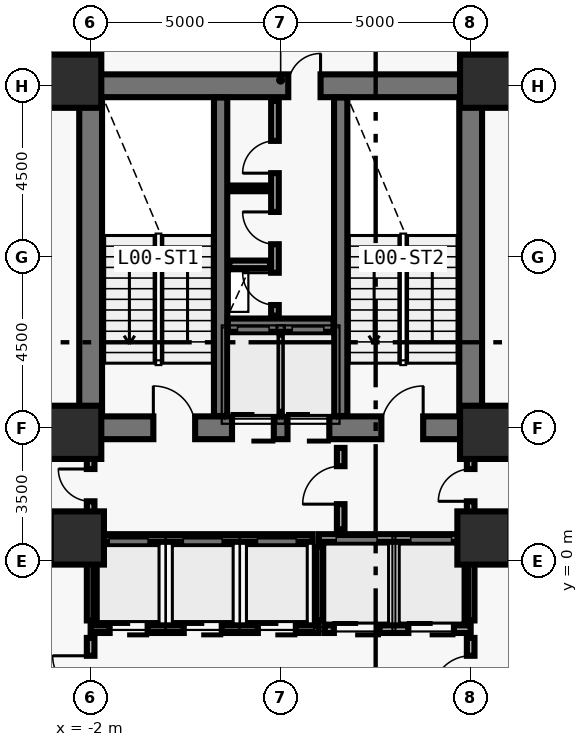
"""IFC4 building model, lengths in metres.
Left out: names, types, materials, properties, quantities, classifications, styles, units other than length and angle.
Written with IfcOpenShell. Run it as: python <this file> out.ifc"""

import sys

from ifc_helpers import new_model, si_unit, direction, frame, frame_2d, origin, origin_2d, place, context, subcontext, project, spatial, rectangle, extrude, element, fill, save


model = new_model("IFC4")
c1 = context("Model", 3, precision=1e-05, world=origin(), true_north=direction((0.0, 1.0)))
c2 = subcontext(c1, "Body", "Model", "MODEL_VIEW")
j1 = project(units=[si_unit("LENGTHUNIT", "METRE"), si_unit("PLANEANGLEUNIT", "RADIAN")], contexts=[c1])
p1 = place(None, origin())
s1 = spatial("IfcSite", under=j1, at=p1, CompositionType="ELEMENT")
p2 = place(p1, origin())
s2 = spatial("IfcBuilding", under=s1, at=p2, CompositionType="ELEMENT")
p3 = place(p2, origin())
s3 = spatial("IfcBuildingStorey", under=s2, at=p3, CompositionType="ELEMENT", Elevation=0.0)
p4 = place(p3, frame((-2.0, 3.5, 0.0), z_axis=(0.0, 0.0, 1.0), x_axis=(1.0, 0.0, 0.0)))
e1 = element("IfcWall", 1, at=p4, inside=s3, PredefinedType="SHEAR", context=c2, shape_type="SweptSolid", body=[
    extrude(rectangle(XDim=10.0, YDim=0.6, at=frame_2d((5.0, 0.0))), origin(), (0.0, 0.0, 1.0), 4.592),
])
p5 = place(p4, frame((1.65, 0.0, 0.0)))
e2 = element("IfcOpeningElement", 2, at=p5, cuts=e1, PredefinedType="OPENING", context=c2, shape_type="SweptSolid", body=[
    extrude(rectangle(XDim=1.1, YDim=2.15, at=frame_2d((0.55, 1.075))), frame((0.0, 0.31, 0.0), z_axis=(0.0, -1.0, 0.0), x_axis=(1.0, 0.0, 0.0)), (0.0, 0.0, 1.0), 0.62),
])
p6 = place(p4, frame((7.65, 0.0, 0.0)))
e3 = element("IfcOpeningElement", 3, at=p6, cuts=e1, PredefinedType="OPENING", context=c2, shape_type="SweptSolid", body=[
    extrude(rectangle(XDim=1.1, YDim=2.15, at=frame_2d((0.55, 1.075))), frame((0.0, 0.31, 0.0), z_axis=(0.0, -1.0, 0.0), x_axis=(1.0, 0.0, 0.0)), (0.0, 0.0, 1.0), 0.62),
])
p7 = place(p4, frame((3.72, 0.0, 0.0)))
e4 = element("IfcOpeningElement", 4, at=p7, cuts=e1, PredefinedType="OPENING", context=c2, shape_type="SweptSolid", body=[
    extrude(rectangle(XDim=1.1, YDim=2.2, at=frame_2d((0.55, 1.1))), frame((0.0, 0.31, 0.0), z_axis=(0.0, -1.0, 0.0), x_axis=(1.0, 0.0, 0.0)), (0.0, 0.0, 1.0), 0.62),
])
p8 = place(p4, frame((5.18, 0.0, 0.0)))
e5 = element("IfcOpeningElement", 5, at=p8, cuts=e1, PredefinedType="OPENING", context=c2, shape_type="SweptSolid", body=[
    extrude(rectangle(XDim=1.1, YDim=2.2, at=frame_2d((0.55, 1.1))), frame((0.0, 0.31, 0.0), z_axis=(0.0, -1.0, 0.0), x_axis=(1.0, 0.0, 0.0)), (0.0, 0.0, 1.0), 0.62),
])
p9 = place(p3, frame((-2.0, 12.5, 0.0), z_axis=(0.0, 0.0, 1.0), x_axis=(1.0, 0.0, 0.0)))
e6 = element("IfcWall", 6, at=p9, inside=s3, PredefinedType="SHEAR", context=c2, shape_type="SweptSolid", body=[
    extrude(rectangle(XDim=10.0, YDim=0.6, at=frame_2d((5.0, 0.0))), origin(), (0.0, 0.0, 1.0), 4.592),
])
p10 = place(p9, frame((5.2, 0.0, 0.0)))
e7 = element("IfcOpeningElement", 7, at=p10, cuts=e6, PredefinedType="OPENING", context=c2, shape_type="SweptSolid", body=[
    extrude(rectangle(XDim=0.85, YDim=2.1, at=frame_2d((0.425, 1.05))), frame((0.0, 0.31, 0.0), z_axis=(0.0, -1.0, 0.0), x_axis=(1.0, 0.0, 0.0)), (0.0, 0.0, 1.0), 0.62),
])
for number, where, z_axis, x_axis in (
    (8, (-2.0, 3.81, 0.0), (0.0, 0.0, 1.0), (0.0, 1.0, 0.0)),
    (9, (8.0, 3.81, 0.0), (0.0, 0.0, 1.0), (0.0, 1.0, 0.0)),
):
    element("IfcWall", number, at=place(p3, frame(where, z_axis=z_axis, x_axis=x_axis)), inside=s3, PredefinedType="SHEAR", context=c2, shape_type="SweptSolid", body=[
        extrude(rectangle(XDim=8.38, YDim=0.6, at=frame_2d((4.19, 0.0))), origin(), (0.0, 0.0, 1.0), 4.592),
    ])
for number, where, z_axis, x_axis in (
    (10, (1.42, 3.81, 0.0), (0.0, 0.0, 1.0), (0.0, 1.0, 0.0)),
    (11, (4.58, 3.81, 0.0), (0.0, 0.0, 1.0), (0.0, 1.0, 0.0)),
):
    element("IfcWall", number, at=place(p3, frame(where, z_axis=z_axis, x_axis=x_axis)), inside=s3, PredefinedType="SHEAR", context=c2, shape_type="SweptSolid", body=[
        extrude(rectangle(XDim=8.38, YDim=0.35, at=frame_2d((4.19, 0.0))), origin(), (0.0, 0.0, 1.0), 4.592),
    ])
p11 = place(p3, frame((1.61, 6.2, 0.0), z_axis=(0.0, 0.0, 1.0), x_axis=(1.0, 0.0, 0.0)))
e12 = element("IfcWall", 12, at=p11, inside=s3, PredefinedType="SHEAR", context=c2, shape_type="SweptSolid", body=[
    extrude(rectangle(XDim=2.78, YDim=0.35, at=frame_2d((1.39, 0.0))), origin(), (0.0, 0.0, 1.0), 4.592),
])
for number, where, z_axis, x_axis in (
    (13, (-2.42, 12.62, 0.0), (0.0, 0.0, 1.0), (1.0, 0.0, 0.0)),
    (14, (8.42, 12.62, 0.0), (0.0, 0.0, 1.0), (1.0, 0.0, 0.0)),
    (15, (-2.42, 3.38, 0.0), (0.0, 0.0, 1.0), (1.0, 0.0, 0.0)),
    (16, (8.42, 3.38, 0.0), (0.0, 0.0, 1.0), (1.0, 0.0, 0.0)),
    (17, (-2.35, 0.6, 0.0), (0.0, 0.0, 1.0), (1.0, 0.0, 0.0)),
    (18, (8.35, 0.6, 0.0), (0.0, 0.0, 1.0), (1.0, 0.0, 0.0)),
):
    element("IfcColumn", number, at=place(p3, frame(where, z_axis=z_axis, x_axis=x_axis)), inside=s3, PredefinedType="COLUMN", context=c2, shape_type="SweptSolid", body=[
        extrude(rectangle(XDim=1.4, YDim=1.4, at=origin_2d()), origin(), (0.0, 0.0, 1.0), 4.575),
    ])
p12 = place(p3, frame((3.0, 3.92, 0.0), z_axis=(0.0, 0.0, 1.0), x_axis=(0.0, 1.0, 0.0)))
e19 = element("IfcWall", 19, at=p12, inside=s3, PredefinedType="SOLIDWALL", context=c2, shape_type="SweptSolid", body=[
    extrude(rectangle(XDim=2.03, YDim=0.2, at=frame_2d((1.015, 0.0))), origin(), (0.0, 0.0, 1.0), 4.28),
])
p13 = place(p3, frame((1.65, 7.8, 0.0), z_axis=(0.0, 0.0, 1.0), x_axis=(1.0, 0.0, 0.0)))
e20 = element("IfcWall", 20, at=p13, inside=s3, PredefinedType="SOLIDWALL", context=c2, shape_type="SweptSolid", body=[
    extrude(rectangle(XDim=1.07, YDim=0.2, at=frame_2d((0.535, 0.0))), origin(), (0.0, 0.0, 1.0), 4.28),
])
p14 = place(p3, frame((4.0, 0.6, 0.0), z_axis=(0.0, 0.0, 1.0), x_axis=(1.0, 0.0, 0.0)))
e21 = element("IfcWall", 21, at=p14, inside=s3, PredefinedType="SOLIDWALL", context=c2, shape_type="SweptSolid", body=[
    extrude(rectangle(XDim=3.88, YDim=0.2, at=frame_2d((1.94, 0.0))), origin(), (0.0, 0.0, 1.0), 3.362),
])
p15 = place(p3, frame((-2.0, -1.8, 0.0), z_axis=(0.0, 0.0, 1.0), x_axis=(1.0, 0.0, 0.0)))
e22 = element("IfcWall", 22, at=p15, inside=s3, PredefinedType="SOLIDWALL", context=c2, shape_type="SweptSolid", body=[
    extrude(rectangle(XDim=6.0, YDim=0.2, at=frame_2d((3.0, 0.0))), origin(), (0.0, 0.0, 1.0), 4.28),
])
p16 = place(p15, frame((0.5, 0.0, 0.0)))
e23 = element("IfcOpeningElement", 23, at=p16, cuts=e22, PredefinedType="OPENING", context=c2, shape_type="SweptSolid", body=[
    extrude(rectangle(XDim=1.0, YDim=2.2, at=frame_2d((0.5, 1.1))), frame((0.0, 0.11, 0.0), z_axis=(0.0, -1.0, 0.0), x_axis=(1.0, 0.0, 0.0)), (0.0, 0.0, 1.0), 0.22),
])
p17 = place(p15, frame((2.45, 0.0, 0.0)))
e24 = element("IfcOpeningElement", 24, at=p17, cuts=e22, PredefinedType="OPENING", context=c2, shape_type="SweptSolid", body=[
    extrude(rectangle(XDim=1.0, YDim=2.2, at=frame_2d((0.5, 1.1))), frame((0.0, 0.11, 0.0), z_axis=(0.0, -1.0, 0.0), x_axis=(1.0, 0.0, 0.0)), (0.0, 0.0, 1.0), 0.22),
])
p18 = place(p15, frame((4.4, 0.0, 0.0)))
e25 = element("IfcOpeningElement", 25, at=p18, cuts=e22, PredefinedType="OPENING", context=c2, shape_type="SweptSolid", body=[
    extrude(rectangle(XDim=1.0, YDim=2.2, at=frame_2d((0.5, 1.1))), frame((0.0, 0.11, 0.0), z_axis=(0.0, -1.0, 0.0), x_axis=(1.0, 0.0, 0.0)), (0.0, 0.0, 1.0), 0.22),
])
p19 = place(p3, frame((-2.0, -1.57, 0.0), z_axis=(0.0, 0.0, 1.0), x_axis=(0.0, 1.0, 0.0)))
e26 = element("IfcWall", 26, at=p19, inside=s3, PredefinedType="SOLIDWALL", context=c2, shape_type="SweptSolid", body=[
    extrude(rectangle(XDim=2.05, YDim=0.2, at=frame_2d((1.025, 0.0))), origin(), (0.0, 0.0, 1.0), 3.362),
])
p20 = place(p3, frame((4.16, -1.8, 0.0), z_axis=(0.0, 0.0, 1.0), x_axis=(1.0, 0.0, 0.0)))
e27 = element("IfcWall", 27, at=p20, inside=s3, PredefinedType="SOLIDWALL", context=c2, shape_type="SweptSolid", body=[
    extrude(rectangle(XDim=3.84, YDim=0.2, at=frame_2d((1.92, 0.0))), origin(), (0.0, 0.0, 1.0), 4.28),
])
p21 = place(p20, frame((0.24, 0.0, 0.0)))
e28 = element("IfcOpeningElement", 28, at=p21, cuts=e27, PredefinedType="OPENING", context=c2, shape_type="SweptSolid", body=[
    extrude(rectangle(XDim=1.2, YDim=2.25, at=frame_2d((0.6, 1.125))), frame((0.0, 0.11, 0.0), z_axis=(0.0, -1.0, 0.0), x_axis=(1.0, 0.0, 0.0)), (0.0, 0.0, 1.0), 0.22),
])
p22 = place(p20, frame((2.2, 0.0, 0.0)))
e29 = element("IfcOpeningElement", 29, at=p22, cuts=e27, PredefinedType="OPENING", context=c2, shape_type="SweptSolid", body=[
    extrude(rectangle(XDim=1.2, YDim=2.25, at=frame_2d((0.6, 1.125))), frame((0.0, 0.11, 0.0), z_axis=(0.0, -1.0, 0.0), x_axis=(1.0, 0.0, 0.0)), (0.0, 0.0, 1.0), 0.22),
])
p23 = place(p3, frame((4.0, -1.57, 0.0), z_axis=(0.0, 0.0, 1.0), x_axis=(0.0, 1.0, 0.0)))
e30 = element("IfcWall", 30, at=p23, inside=s3, PredefinedType="SOLIDWALL", context=c2, shape_type="SweptSolid", body=[
    extrude(rectangle(XDim=1.94, YDim=0.2, at=frame_2d((0.97, 0.0))), origin(), (0.0, 0.0, 1.0), 4.28),
])
p24 = place(p3, frame((8.0, -1.57, 0.0), z_axis=(0.0, 0.0, 1.0), x_axis=(0.0, 1.0, 0.0)))
e31 = element("IfcWall", 31, at=p24, inside=s3, PredefinedType="SOLIDWALL", context=c2, shape_type="SweptSolid", body=[
    extrude(rectangle(XDim=2.05, YDim=0.2, at=frame_2d((1.025, 0.0))), origin(), (0.0, 0.0, 1.0), 3.362),
])
p25 = place(p3, frame((2.85, 6.45, 0.0), z_axis=(0.0, 0.0, 1.0), x_axis=(0.0, 1.0, 0.0)))
e32 = element("IfcWall", 32, at=p25, inside=s3, PredefinedType="MOVABLE", context=c2, shape_type="SweptSolid", body=[
    extrude(rectangle(XDim=5.65, YDim=0.2, at=frame_2d((2.825, 0.0))), origin(), (0.0, 0.0, 1.0), 4.28),
])
p26 = place(p25, frame((1.88, 0.0, 0.0)))
e33 = element("IfcOpeningElement", 33, at=p26, cuts=e32, PredefinedType="OPENING", context=c2, shape_type="SweptSolid", body=[
    extrude(rectangle(XDim=0.85, YDim=2.05, at=frame_2d((0.425, 1.025))), frame((0.0, 0.11, 0.0), z_axis=(0.0, -1.0, 0.0), x_axis=(1.0, 0.0, 0.0)), (0.0, 0.0, 1.0), 0.22),
])
p27 = place(p25, frame((3.75, 0.0, 0.0)))
e34 = element("IfcOpeningElement", 34, at=p27, cuts=e32, PredefinedType="OPENING", context=c2, shape_type="SweptSolid", body=[
    extrude(rectangle(XDim=0.85, YDim=2.1, at=frame_2d((0.425, 1.05))), frame((0.0, 0.11, 0.0), z_axis=(0.0, -1.0, 0.0), x_axis=(1.0, 0.0, 0.0)), (0.0, 0.0, 1.0), 0.22),
])
p28 = place(p25, frame((0.28, 0.0, 0.0)))
e35 = element("IfcOpeningElement", 35, at=p28, cuts=e32, PredefinedType="OPENING", context=c2, shape_type="SweptSolid", body=[
    extrude(rectangle(XDim=0.85, YDim=2.1, at=frame_2d((0.425, 1.05))), frame((0.0, 0.11, 0.0), z_axis=(0.0, -1.0, 0.0), x_axis=(1.0, 0.0, 0.0)), (0.0, 0.0, 1.0), 0.22),
])
p29 = place(p3, frame((4.58, 0.83, 0.0), z_axis=(0.0, 0.0, 1.0), x_axis=(0.0, 1.0, 0.0)))
e36 = element("IfcWall", 36, at=p29, inside=s3, PredefinedType="MOVABLE", context=c2, shape_type="SweptSolid", body=[
    extrude(rectangle(XDim=2.14, YDim=0.2, at=frame_2d((1.07, 0.0))), origin(), (0.0, 0.0, 1.0), 4.28),
])
p30 = place(p29, frame((0.66, 0.0, 0.0)))
e37 = element("IfcOpeningElement", 37, at=p30, cuts=e36, PredefinedType="OPENING", context=c2, shape_type="SweptSolid", body=[
    extrude(rectangle(XDim=1.0, YDim=2.1, at=frame_2d((0.5, 1.05))), frame((0.0, 0.11, 0.0), z_axis=(0.0, -1.0, 0.0), x_axis=(1.0, 0.0, 0.0)), (0.0, 0.0, 1.0), 0.22),
])
p31 = place(p3, frame((-2.0, 0.72, 0.0), z_axis=(0.0, 0.0, 1.0), x_axis=(0.0, 1.0, 0.0)))
e38 = element("IfcWall", 38, at=p31, inside=s3, PredefinedType="MOVABLE", context=c2, shape_type="SweptSolid", body=[
    extrude(rectangle(XDim=2.25, YDim=0.2, at=frame_2d((1.125, 0.0))), origin(), (0.0, 0.0, 1.0), 3.362),
])
p32 = place(p31, frame((0.845, 0.0, 0.0)))
e39 = element("IfcOpeningElement", 39, at=p32, cuts=e38, PredefinedType="OPENING", context=c2, shape_type="SweptSolid", body=[
    extrude(rectangle(XDim=0.85, YDim=2.1, at=frame_2d((0.425, 1.05))), frame((0.0, 0.11, 0.0), z_axis=(0.0, -1.0, 0.0), x_axis=(1.0, 0.0, 0.0)), (0.0, 0.0, 1.0), 0.22),
])
p33 = place(p3, frame((8.0, 0.72, 0.0), z_axis=(0.0, 0.0, 1.0), x_axis=(0.0, 1.0, 0.0)))
e40 = element("IfcWall", 40, at=p33, inside=s3, PredefinedType="MOVABLE", context=c2, shape_type="SweptSolid", body=[
    extrude(rectangle(XDim=2.25, YDim=0.2, at=frame_2d((1.125, 0.0))), origin(), (0.0, 0.0, 1.0), 3.362),
])
p34 = place(p33, frame((0.845, 0.0, 0.0)))
e41 = element("IfcOpeningElement", 41, at=p34, cuts=e40, PredefinedType="OPENING", context=c2, shape_type="SweptSolid", body=[
    extrude(rectangle(XDim=0.85, YDim=2.1, at=frame_2d((0.425, 1.05))), frame((0.0, 0.11, 0.0), z_axis=(0.0, -1.0, 0.0), x_axis=(1.0, 0.0, 0.0)), (0.0, 0.0, 1.0), 0.22),
])
p35 = place(p3, frame((-2.0, -3.97, 0.0), z_axis=(0.0, 0.0, 1.0), x_axis=(0.0, 1.0, 0.0)))
e42 = element("IfcWall", 42, at=p35, inside=s3, PredefinedType="MOVABLE", context=c2, shape_type="SweptSolid", body=[
    extrude(rectangle(XDim=1.94, YDim=0.2, at=frame_2d((0.97, 0.0))), origin(), (0.0, 0.0, 1.0), 3.362),
])
p36 = place(p35, frame((0.47, 0.0, 0.0)))
e43 = element("IfcOpeningElement", 43, at=p36, cuts=e42, PredefinedType="OPENING", context=c2, shape_type="SweptSolid", body=[
    extrude(rectangle(XDim=1.0, YDim=2.1, at=frame_2d((0.5, 1.05))), frame((0.0, 0.11, 0.0), z_axis=(0.0, -1.0, 0.0), x_axis=(1.0, 0.0, 0.0)), (0.0, 0.0, 1.0), 0.22),
])
p37 = place(p3, frame((8.0, -3.97, 0.0), z_axis=(0.0, 0.0, 1.0), x_axis=(0.0, 1.0, 0.0)))
e44 = element("IfcWall", 44, at=p37, inside=s3, PredefinedType="MOVABLE", context=c2, shape_type="SweptSolid", body=[
    extrude(rectangle(XDim=1.94, YDim=0.2, at=frame_2d((0.97, 0.0))), origin(), (0.0, 0.0, 1.0), 3.362),
])
p38 = place(p37, frame((0.47, 0.0, 0.0)))
e45 = element("IfcOpeningElement", 45, at=p38, cuts=e44, PredefinedType="OPENING", context=c2, shape_type="SweptSolid", body=[
    extrude(rectangle(XDim=1.0, YDim=2.1, at=frame_2d((0.5, 1.05))), frame((0.0, 0.11, 0.0), z_axis=(0.0, -1.0, 0.0), x_axis=(1.0, 0.0, 0.0)), (0.0, 0.0, 1.0), 0.22),
])
p39 = place(p3, frame((8.11, 0.25, 0.0), z_axis=(0.0, 0.0, 1.0), x_axis=(1.0, 0.0, 0.0)))
e46 = element("IfcWall", 46, at=p39, inside=s3, PredefinedType="MOVABLE", context=c2, shape_type="SweptSolid", body=[
    extrude(rectangle(XDim=24.94, YDim=0.2, at=frame_2d((12.47, 0.0))), origin(), (0.0, 0.0, 1.0), 4.28),
])
p40 = place(p39, frame((11.865, 0.0, 0.0)))
e47 = element("IfcOpeningElement", 47, at=p40, cuts=e46, PredefinedType="OPENING", context=c2, shape_type="SweptSolid", body=[
    extrude(rectangle(XDim=1.1, YDim=2.1, at=frame_2d((0.55, 1.05))), frame((0.0, 0.11, 0.0), z_axis=(0.0, -1.0, 0.0), x_axis=(1.0, 0.0, 0.0)), (0.0, 0.0, 1.0), 0.22),
])
p41 = place(p3, frame((1.65, 9.8, 0.0), z_axis=(0.0, 0.0, 1.0), x_axis=(1.0, 0.0, 0.0)))
e48 = element("IfcWall", 48, at=p41, inside=s3, PredefinedType="PARTITIONING", context=c2, shape_type="SweptSolid", body=[
    extrude(rectangle(XDim=0.96, YDim=0.15, at=frame_2d((0.48, 0.0))), origin(), (0.0, 0.0, 1.0), 4.28),
])
p42 = place(p3, frame((-1.88, 0.6, 0.0), z_axis=(0.0, 0.0, 1.0), x_axis=(1.0, 0.0, 0.0)))
e49 = element("IfcWall", 49, at=p42, inside=s3, PredefinedType="MOVABLE", context=c2, shape_type="SweptSolid", body=[
    extrude(rectangle(XDim=5.72, YDim=0.2, at=frame_2d((2.86, 0.0))), origin(), (0.0, 0.0, 1.0), 3.362),
])
p43 = place(p3, frame((16.515, 3.5, 0.0), z_axis=(0.0, 0.0, 1.0), x_axis=(-1.0, 0.0, 0.0)))
e50 = element("IfcWall", 50, at=p43, inside=s3, PredefinedType="MOVABLE", context=c2, shape_type="SweptSolid", body=[
    extrude(rectangle(XDim=8.155, YDim=0.2, at=frame_2d((4.077, 0.0))), origin(), (0.0, 0.0, 1.0), 4.28),
])
p44 = place(p5, origin())
e51 = element("IfcDoor", 51, at=p44, inside=s3, OperationType="SINGLE_SWING_LEFT", PredefinedType="DOOR", context=c2, shape_type="SweptSolid", body=[
    extrude(rectangle(XDim=1.1, YDim=2.15, at=frame_2d((0.55, 1.075))), frame((0.0, 0.025, 0.0), z_axis=(0.0, -1.0, 0.0), x_axis=(1.0, 0.0, 0.0)), (0.0, 0.0, 1.0), 0.05),
])
fill(e2, e51)
p45 = place(p6, origin())
e52 = element("IfcDoor", 52, at=p45, inside=s3, OperationType="SINGLE_SWING_RIGHT", PredefinedType="DOOR", context=c2, shape_type="SweptSolid", body=[
    extrude(rectangle(XDim=1.1, YDim=2.15, at=frame_2d((0.55, 1.075))), frame((0.0, 0.025, 0.0), z_axis=(0.0, -1.0, 0.0), x_axis=(1.0, 0.0, 0.0)), (0.0, 0.0, 1.0), 0.05),
])
fill(e3, e52)
p46 = place(p7, origin())
e53 = element("IfcDoor", 53, at=p46, inside=s3, OperationType="DOUBLE_DOOR_SLIDING", PredefinedType="DOOR", context=c2, shape_type="SweptSolid", body=[
    extrude(rectangle(XDim=1.1, YDim=2.2, at=frame_2d((0.55, 1.1))), frame((0.0, 0.025, 0.0), z_axis=(0.0, -1.0, 0.0), x_axis=(1.0, 0.0, 0.0)), (0.0, 0.0, 1.0), 0.05),
])
fill(e4, e53)
p47 = place(p8, origin())
e54 = element("IfcDoor", 54, at=p47, inside=s3, OperationType="DOUBLE_DOOR_SLIDING", PredefinedType="DOOR", context=c2, shape_type="SweptSolid", body=[
    extrude(rectangle(XDim=1.1, YDim=2.2, at=frame_2d((0.55, 1.1))), frame((0.0, 0.025, 0.0), z_axis=(0.0, -1.0, 0.0), x_axis=(1.0, 0.0, 0.0)), (0.0, 0.0, 1.0), 0.05),
])
fill(e5, e54)
p48 = place(p10, origin())
e55 = element("IfcDoor", 55, at=p48, inside=s3, OperationType="SINGLE_SWING_RIGHT", PredefinedType="DOOR", context=c2, shape_type="SweptSolid", body=[
    extrude(rectangle(XDim=0.85, YDim=2.1, at=frame_2d((0.425, 1.05))), frame((0.0, 0.025, 0.0), z_axis=(0.0, -1.0, 0.0), x_axis=(1.0, 0.0, 0.0)), (0.0, 0.0, 1.0), 0.05),
])
fill(e7, e55)
p49 = place(p26, origin())
e56 = element("IfcDoor", 56, at=p49, inside=s3, OperationType="SINGLE_SWING_RIGHT", PredefinedType="DOOR", context=c2, shape_type="SweptSolid", body=[
    extrude(rectangle(XDim=0.85, YDim=2.05, at=frame_2d((0.425, 1.025))), frame((0.0, 0.025, 0.0), z_axis=(0.0, -1.0, 0.0), x_axis=(1.0, 0.0, 0.0)), (0.0, 0.0, 1.0), 0.05),
])
fill(e33, e56)
p50 = place(p27, origin())
e57 = element("IfcDoor", 57, at=p50, inside=s3, OperationType="SINGLE_SWING_LEFT", PredefinedType="DOOR", context=c2, shape_type="SweptSolid", body=[
    extrude(rectangle(XDim=0.85, YDim=2.1, at=frame_2d((0.425, 1.05))), frame((0.0, 0.025, 0.0), z_axis=(0.0, -1.0, 0.0), x_axis=(1.0, 0.0, 0.0)), (0.0, 0.0, 1.0), 0.05),
])
fill(e34, e57)
p51 = place(p28, origin())
e58 = element("IfcDoor", 58, at=p51, inside=s3, OperationType="SINGLE_SWING_RIGHT", PredefinedType="DOOR", context=c2, shape_type="SweptSolid", body=[
    extrude(rectangle(XDim=0.85, YDim=2.1, at=frame_2d((0.425, 1.05))), frame((0.0, 0.025, 0.0), z_axis=(0.0, -1.0, 0.0), x_axis=(1.0, 0.0, 0.0)), (0.0, 0.0, 1.0), 0.05),
])
fill(e35, e58)
p52 = place(p30, origin())
e59 = element("IfcDoor", 59, at=p52, inside=s3, OperationType="SINGLE_SWING_LEFT", PredefinedType="DOOR", context=c2, shape_type="SweptSolid", body=[
    extrude(rectangle(XDim=1.0, YDim=2.1, at=frame_2d((0.5, 1.05))), frame((0.0, 0.025, 0.0), z_axis=(0.0, -1.0, 0.0), x_axis=(1.0, 0.0, 0.0)), (0.0, 0.0, 1.0), 0.05),
])
fill(e37, e59)
p53 = place(p32, origin())
e60 = element("IfcDoor", 60, at=p53, inside=s3, OperationType="SINGLE_SWING_RIGHT", PredefinedType="DOOR", context=c2, shape_type="SweptSolid", body=[
    extrude(rectangle(XDim=0.85, YDim=2.1, at=frame_2d((0.425, 1.05))), frame((0.0, 0.025, 0.0), z_axis=(0.0, -1.0, 0.0), x_axis=(1.0, 0.0, 0.0)), (0.0, 0.0, 1.0), 0.05),
])
fill(e39, e60)
p54 = place(p34, origin())
e61 = element("IfcDoor", 61, at=p54, inside=s3, OperationType="SINGLE_SWING_LEFT", PredefinedType="DOOR", context=c2, shape_type="SweptSolid", body=[
    extrude(rectangle(XDim=0.85, YDim=2.1, at=frame_2d((0.425, 1.05))), frame((0.0, 0.025, 0.0), z_axis=(0.0, -1.0, 0.0), x_axis=(1.0, 0.0, 0.0)), (0.0, 0.0, 1.0), 0.05),
])
fill(e41, e61)
p55 = place(p36, origin())
e62 = element("IfcDoor", 62, at=p55, inside=s3, OperationType="SINGLE_SWING_RIGHT", PredefinedType="DOOR", context=c2, shape_type="SweptSolid", body=[
    extrude(rectangle(XDim=1.0, YDim=2.1, at=frame_2d((0.5, 1.05))), frame((0.0, 0.025, 0.0), z_axis=(0.0, -1.0, 0.0), x_axis=(1.0, 0.0, 0.0)), (0.0, 0.0, 1.0), 0.05),
])
fill(e43, e62)
p56 = place(p38, origin())
e63 = element("IfcDoor", 63, at=p56, inside=s3, OperationType="SINGLE_SWING_LEFT", PredefinedType="DOOR", context=c2, shape_type="SweptSolid", body=[
    extrude(rectangle(XDim=1.0, YDim=2.1, at=frame_2d((0.5, 1.05))), frame((0.0, 0.025, 0.0), z_axis=(0.0, -1.0, 0.0), x_axis=(1.0, 0.0, 0.0)), (0.0, 0.0, 1.0), 0.05),
])
fill(e45, e63)
p57 = place(p16, origin())
e64 = element("IfcDoor", 64, at=p57, inside=s3, OperationType="DOUBLE_DOOR_SLIDING", PredefinedType="DOOR", context=c2, shape_type="SweptSolid", body=[
    extrude(rectangle(XDim=1.0, YDim=2.2, at=frame_2d((0.5, 1.1))), frame((0.0, 0.025, 0.0), z_axis=(0.0, -1.0, 0.0), x_axis=(1.0, 0.0, 0.0)), (0.0, 0.0, 1.0), 0.05),
])
fill(e23, e64)
p58 = place(p17, origin())
e65 = element("IfcDoor", 65, at=p58, inside=s3, OperationType="DOUBLE_DOOR_SLIDING", PredefinedType="DOOR", context=c2, shape_type="SweptSolid", body=[
    extrude(rectangle(XDim=1.0, YDim=2.2, at=frame_2d((0.5, 1.1))), frame((0.0, 0.025, 0.0), z_axis=(0.0, -1.0, 0.0), x_axis=(1.0, 0.0, 0.0)), (0.0, 0.0, 1.0), 0.05),
])
fill(e24, e65)
p59 = place(p18, origin())
e66 = element("IfcDoor", 66, at=p59, inside=s3, OperationType="DOUBLE_DOOR_SLIDING", PredefinedType="DOOR", context=c2, shape_type="SweptSolid", body=[
    extrude(rectangle(XDim=1.0, YDim=2.2, at=frame_2d((0.5, 1.1))), frame((0.0, 0.025, 0.0), z_axis=(0.0, -1.0, 0.0), x_axis=(1.0, 0.0, 0.0)), (0.0, 0.0, 1.0), 0.05),
])
fill(e25, e66)
p60 = place(p21, origin())
e67 = element("IfcDoor", 67, at=p60, inside=s3, OperationType="DOUBLE_DOOR_SLIDING", PredefinedType="DOOR", context=c2, shape_type="SweptSolid", body=[
    extrude(rectangle(XDim=1.2, YDim=2.25, at=frame_2d((0.6, 1.125))), frame((0.0, 0.025, 0.0), z_axis=(0.0, -1.0, 0.0), x_axis=(1.0, 0.0, 0.0)), (0.0, 0.0, 1.0), 0.05),
])
fill(e28, e67)
p61 = place(p22, origin())
e68 = element("IfcDoor", 68, at=p61, inside=s3, OperationType="DOUBLE_DOOR_SLIDING", PredefinedType="DOOR", context=c2, shape_type="SweptSolid", body=[
    extrude(rectangle(XDim=1.2, YDim=2.25, at=frame_2d((0.6, 1.125))), frame((0.0, 0.025, 0.0), z_axis=(0.0, -1.0, 0.0), x_axis=(1.0, 0.0, 0.0)), (0.0, 0.0, 1.0), 0.05),
])
fill(e29, e68)
save(model, sys.argv[1])
